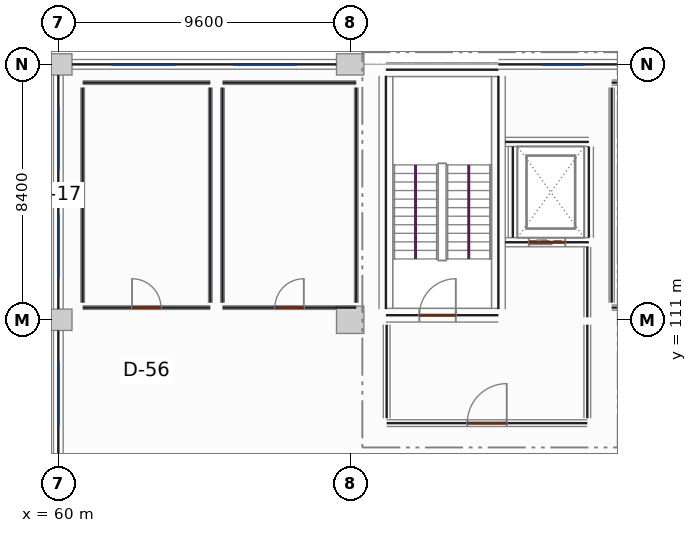
"""IFC4 building model, lengths in metres.
Left out: names, types, materials, properties, quantities, classifications, styles, units other than length and angle.
Written with IfcOpenShell. Run it as: python <this file> out.ifc"""

import sys

from ifc_helpers import new_model, si_unit, direction, frame, frame_2d, origin, origin_2d, place, context, subcontext, project, spatial, rectangle, extrude, element, fill, save


model = new_model("IFC4")
c1 = context("Model", 3, precision=1e-05, world=origin(), true_north=direction((0.0, 1.0)))
c2 = subcontext(c1, "Body", "Model", "MODEL_VIEW")
j1 = project(units=[si_unit("LENGTHUNIT", "METRE"), si_unit("PLANEANGLEUNIT", "RADIAN")], contexts=[c1])
p1 = place(None, origin())
s1 = spatial("IfcSite", under=j1, at=p1, CompositionType="ELEMENT")
p2 = place(p1, origin())
s2 = spatial("IfcBuilding", under=s1, at=p2, CompositionType="ELEMENT")
p3 = place(p2, frame((0.0, 0.0, 9.9)))
s3 = spatial("IfcBuildingStorey", under=s2, at=p3, CompositionType="ELEMENT", Elevation=9.9)
for number, where, z_axis, x_axis in (
    (1, (60.0, 111.0, 0.0), (0.0, 0.0, 1.0), (1.0, 0.0, 0.0)),
    (2, (60.0, 119.4, 0.0), (0.0, 0.0, 1.0), (1.0, 0.0, 0.0)),
):
    element("IfcColumn", number, at=place(p3, frame(where, z_axis=z_axis, x_axis=x_axis)), inside=s3, PredefinedType="COLUMN", context=c2, shape_type="SweptSolid", body=[
        extrude(rectangle(XDim=0.9, YDim=0.7, at=origin_2d()), origin(), (0.0, 0.0, 1.0), 3.9),
    ])
p4 = place(p3, frame((69.6, 111.0, 0.0), z_axis=(0.0, 0.0, 1.0), x_axis=(1.0, 0.0, 0.0)))
e3 = element("IfcColumn", 3, at=p4, inside=s3, PredefinedType="COLUMN", context=c2, shape_type="SweptSolid", body=[
    extrude(rectangle(XDim=0.9, YDim=0.9, at=origin_2d()), origin(), (0.0, 0.0, 1.0), 3.9),
])
p5 = place(p3, frame((69.6, 119.4, 0.0), z_axis=(0.0, 0.0, 1.0), x_axis=(1.0, 0.0, 0.0)))
e4 = element("IfcColumn", 4, at=p5, inside=s3, PredefinedType="COLUMN", context=c2, shape_type="SweptSolid", body=[
    extrude(rectangle(XDim=0.9, YDim=0.7, at=origin_2d()), origin(), (0.0, 0.0, 1.0), 3.9),
])
p6 = place(p3, frame((60.0, 102.952, 0.0), z_axis=(0.0, 0.0, 1.0), x_axis=(0.0, 1.0, 0.0)))
e5 = element("IfcWall", 5, at=p6, inside=s3, PredefinedType="SOLIDWALL", context=c2, shape_type="SweptSolid", body=[
    extrude(rectangle(XDim=7.696, YDim=0.32, at=frame_2d((3.848, 0.0))), origin(), (0.0, 0.0, 1.0), 3.08),
])
p7 = place(p6, frame((1.028, 0.0, 0.85)))
e6 = element("IfcOpeningElement", 6, at=p7, cuts=e5, PredefinedType="OPENING", context=c2, shape_type="SweptSolid", body=[
    extrude(rectangle(XDim=2.1, YDim=1.95, at=frame_2d((1.05, 0.975))), frame((0.0, 0.17, 0.0), z_axis=(0.0, -1.0, 0.0), x_axis=(1.0, 0.0, 0.0)), (0.0, 0.0, 1.0), 0.34),
])
p8 = place(p6, frame((4.568, 0.0, 0.85)))
e7 = element("IfcOpeningElement", 7, at=p8, cuts=e5, PredefinedType="OPENING", context=c2, shape_type="SweptSolid", body=[
    extrude(rectangle(XDim=2.1, YDim=1.95, at=frame_2d((1.05, 0.975))), frame((0.0, 0.17, 0.0), z_axis=(0.0, -1.0, 0.0), x_axis=(1.0, 0.0, 0.0)), (0.0, 0.0, 1.0), 0.34),
])
p9 = place(p3, frame((60.0, 111.352, 0.0), z_axis=(0.0, 0.0, 1.0), x_axis=(0.0, 1.0, 0.0)))
e8 = element("IfcWall", 8, at=p9, inside=s3, PredefinedType="SOLIDWALL", context=c2, shape_type="SweptSolid", body=[
    extrude(rectangle(XDim=7.696, YDim=0.32, at=frame_2d((3.848, 0.0))), origin(), (0.0, 0.0, 1.0), 3.08),
])
p10 = place(p9, frame((1.028, 0.0, 0.85)))
e9 = element("IfcOpeningElement", 9, at=p10, cuts=e8, PredefinedType="OPENING", context=c2, shape_type="SweptSolid", body=[
    extrude(rectangle(XDim=2.1, YDim=1.95, at=frame_2d((1.05, 0.975))), frame((0.0, 0.17, 0.0), z_axis=(0.0, -1.0, 0.0), x_axis=(1.0, 0.0, 0.0)), (0.0, 0.0, 1.0), 0.34),
])
p11 = place(p9, frame((4.568, 0.0, 0.85)))
e10 = element("IfcOpeningElement", 10, at=p11, cuts=e8, PredefinedType="OPENING", context=c2, shape_type="SweptSolid", body=[
    extrude(rectangle(XDim=2.1, YDim=1.95, at=frame_2d((1.05, 0.975))), frame((0.0, 0.17, 0.0), z_axis=(0.0, -1.0, 0.0), x_axis=(1.0, 0.0, 0.0)), (0.0, 0.0, 1.0), 0.34),
])
p12 = place(p3, frame((60.452, 119.4, 0.0), z_axis=(0.0, 0.0, 1.0), x_axis=(1.0, 0.0, 0.0)))
e11 = element("IfcWall", 11, at=p12, inside=s3, PredefinedType="SOLIDWALL", context=c2, shape_type="SweptSolid", body=[
    extrude(rectangle(XDim=8.696, YDim=0.32, at=frame_2d((4.348, 0.0))), origin(), (0.0, 0.0, 1.0), 3.08),
])
p13 = place(p12, frame((1.298, 0.0, 0.85)))
e12 = element("IfcOpeningElement", 12, at=p13, cuts=e11, PredefinedType="OPENING", context=c2, shape_type="SweptSolid", body=[
    extrude(rectangle(XDim=2.1, YDim=1.95, at=frame_2d((1.05, 0.975))), frame((0.0, 0.17, 0.0), z_axis=(0.0, -1.0, 0.0), x_axis=(1.0, 0.0, 0.0)), (0.0, 0.0, 1.0), 0.34),
])
p14 = place(p12, frame((5.298, 0.0, 0.85)))
e13 = element("IfcOpeningElement", 13, at=p14, cuts=e11, PredefinedType="OPENING", context=c2, shape_type="SweptSolid", body=[
    extrude(rectangle(XDim=2.1, YDim=1.95, at=frame_2d((1.05, 0.975))), frame((0.0, 0.17, 0.0), z_axis=(0.0, -1.0, 0.0), x_axis=(1.0, 0.0, 0.0)), (0.0, 0.0, 1.0), 0.34),
])
p15 = place(p3, frame((74.476, 119.4, 0.0), z_axis=(0.0, 0.0, 1.0), x_axis=(1.0, 0.0, 0.0)))
e14 = element("IfcWall", 14, at=p15, inside=s3, PredefinedType="SOLIDWALL", context=c2, shape_type="SweptSolid", body=[
    extrude(rectangle(XDim=4.272, YDim=0.32, at=frame_2d((2.136, 0.0))), origin(), (0.0, 0.0, 1.0), 3.08),
])
p16 = place(p15, frame((1.436, 0.0, 0.9)))
e15 = element("IfcOpeningElement", 15, at=p16, cuts=e14, PredefinedType="OPENING", context=c2, shape_type="SweptSolid", body=[
    extrude(rectangle(XDim=1.4, YDim=1.65, at=frame_2d((0.7, 0.825))), frame((0.0, 0.17, 0.0), z_axis=(0.0, -1.0, 0.0), x_axis=(1.0, 0.0, 0.0)), (0.0, 0.0, 1.0), 0.34),
])
p17 = place(p3, frame((70.775, 111.15, 0.0), z_axis=(0.0, 0.0, 1.0), x_axis=(1.0, 0.0, 0.0)))
e16 = element("IfcWall", 16, at=p17, inside=s3, PredefinedType="SHEAR", context=c2, shape_type="SweptSolid", body=[
    extrude(rectangle(XDim=3.7, YDim=0.45, at=frame_2d((1.85, 0.0))), origin(), (0.0, 0.0, 1.0), 3.9),
])
p18 = place(p17, frame((1.1, 0.0, 0.0)))
e17 = element("IfcOpeningElement", 17, at=p18, cuts=e16, PredefinedType="OPENING", context=c2, shape_type="SweptSolid", body=[
    extrude(rectangle(XDim=1.2, YDim=2.2, at=frame_2d((0.6, 1.1))), frame((0.0, 0.235, 0.0), z_axis=(0.0, -1.0, 0.0), x_axis=(1.0, 0.0, 0.0)), (0.0, 0.0, 1.0), 0.47),
])
for number, where, z_axis, x_axis in (
    (18, (70.775, 111.35, 0.0), (0.0, 0.0, 1.0), (0.0, 1.0, 0.0)),
    (19, (74.475, 111.35, 0.0), (0.0, 0.0, 1.0), (0.0, 1.0, 0.0)),
):
    element("IfcWall", number, at=place(p3, frame(where, z_axis=z_axis, x_axis=x_axis)), inside=s3, PredefinedType="SHEAR", context=c2, shape_type="SweptSolid", body=[
        extrude(rectangle(XDim=7.675, YDim=0.45, at=frame_2d((3.837, 0.0))), origin(), (0.0, 0.0, 1.0), 3.9),
    ])
p19 = place(p3, frame((70.775, 119.225, 0.0), z_axis=(0.0, 0.0, 1.0), x_axis=(1.0, 0.0, 0.0)))
e20 = element("IfcWall", 20, at=p19, inside=s3, PredefinedType="SHEAR", context=c2, shape_type="SweptSolid", body=[
    extrude(rectangle(XDim=3.7, YDim=0.45, at=frame_2d((1.85, 0.0))), origin(), (0.0, 0.0, 1.0), 3.9),
])
p20 = place(p3, frame((74.7, 113.55, 0.0), z_axis=(0.0, 0.0, 1.0), x_axis=(1.0, 0.0, 0.0)))
e21 = element("IfcWall", 21, at=p20, inside=s3, PredefinedType="SHEAR", context=c2, shape_type="SweptSolid", body=[
    extrude(rectangle(XDim=2.75, YDim=0.3, at=frame_2d((1.375, 0.0))), origin(), (0.0, 0.0, 1.0), 3.9),
])
p21 = place(p20, frame((0.775, 0.0, 0.0)))
e22 = element("IfcOpeningElement", 22, at=p21, cuts=e21, PredefinedType="OPENING", context=c2, shape_type="SweptSolid", body=[
    extrude(rectangle(XDim=1.2, YDim=2.2, at=frame_2d((0.6, 1.1))), frame((0.0, 0.16, 0.0), z_axis=(0.0, -1.0, 0.0), x_axis=(1.0, 0.0, 0.0)), (0.0, 0.0, 1.0), 0.32),
])
p22 = place(p3, frame((74.7, 116.85, 0.0), z_axis=(0.0, 0.0, 1.0), x_axis=(1.0, 0.0, 0.0)))
e23 = element("IfcWall", 23, at=p22, inside=s3, PredefinedType="SHEAR", context=c2, shape_type="SweptSolid", body=[
    extrude(rectangle(XDim=2.75, YDim=0.3, at=frame_2d((1.375, 0.0))), origin(), (0.0, 0.0, 1.0), 3.9),
])
for number, where, z_axis, x_axis in (
    (24, (74.95, 113.7, 0.0), (0.0, 0.0, 1.0), (0.0, 1.0, 0.0)),
    (25, (77.45, 113.7, 0.0), (0.0, 0.0, 1.0), (0.0, 1.0, 0.0)),
):
    element("IfcWall", number, at=place(p3, frame(where, z_axis=z_axis, x_axis=x_axis)), inside=s3, PredefinedType="SHEAR", context=c2, shape_type="SweptSolid", body=[
        extrude(rectangle(XDim=3.0, YDim=0.3, at=frame_2d((1.5, 0.0))), origin(), (0.0, 0.0, 1.0), 3.9),
    ])
p23 = place(p3, frame((70.8, 107.6, 0.0), z_axis=(0.0, 0.0, 1.0), x_axis=(1.0, 0.0, 0.0)))
e26 = element("IfcWall", 26, at=p23, inside=s3, PredefinedType="PARTITIONING", context=c2, shape_type="SweptSolid", body=[
    extrude(rectangle(XDim=6.6, YDim=0.22, at=frame_2d((3.3, 0.0))), origin(), (0.0, 0.0, 1.0), 2.92),
])
p24 = place(p23, frame((2.65, 0.0, 0.0)))
e27 = element("IfcOpeningElement", 27, at=p24, cuts=e26, PredefinedType="OPENING", context=c2, shape_type="SweptSolid", body=[
    extrude(rectangle(XDim=1.3, YDim=2.2, at=frame_2d((0.65, 1.1))), frame((0.0, 0.12, 0.0), z_axis=(0.0, -1.0, 0.0), x_axis=(1.0, 0.0, 0.0)), (0.0, 0.0, 1.0), 0.24),
])
p25 = place(p3, frame((77.4, 111.08, 0.0), z_axis=(0.0, 0.0, 1.0), x_axis=(0.0, 1.0, 0.0)))
e28 = element("IfcWall", 28, at=p25, inside=s3, PredefinedType="PARTITIONING", context=c2, shape_type="SweptSolid", body=[
    extrude(rectangle(XDim=2.32, YDim=0.22, at=frame_2d((1.16, 0.0))), origin(), (0.0, 0.0, 1.0), 2.92),
])
for number, where, z_axis, x_axis in (
    (29, (70.8, 107.76, 0.0), (0.0, 0.0, 1.0), (0.0, 1.0, 0.0)),
    (30, (77.4, 107.76, 0.0), (0.0, 0.0, 1.0), (0.0, 1.0, 0.0)),
):
    element("IfcWall", number, at=place(p3, frame(where, z_axis=z_axis, x_axis=x_axis)), inside=s3, PredefinedType="PARTITIONING", context=c2, shape_type="SweptSolid", body=[
        extrude(rectangle(XDim=3.08, YDim=0.22, at=frame_2d((1.54, 0.0))), origin(), (0.0, 0.0, 1.0), 2.92),
    ])
p26 = place(p3, frame((78.2, 111.4, 0.0), z_axis=(0.0, 0.0, 1.0), x_axis=(1.0, 0.0, 0.0)))
e31 = element("IfcWall", 31, at=p26, inside=s3, PredefinedType="PARTITIONING", context=c2, shape_type="SweptSolid", body=[
    extrude(rectangle(XDim=21.4, YDim=0.17, at=frame_2d((10.7, 0.0))), origin(), (0.0, 0.0, 1.0), 2.92),
])
p27 = place(p26, frame((6.94, 0.0, 0.0)))
e32 = element("IfcOpeningElement", 32, at=p27, cuts=e31, PredefinedType="OPENING", context=c2, shape_type="SweptSolid", body=[
    extrude(rectangle(XDim=1.1, YDim=2.2, at=frame_2d((0.55, 1.1))), frame((0.0, 0.095, 0.0), z_axis=(0.0, -1.0, 0.0), x_axis=(1.0, 0.0, 0.0)), (0.0, 0.0, 1.0), 0.19),
])
p28 = place(p3, frame((78.2, 118.8, 0.0), z_axis=(0.0, 0.0, 1.0), x_axis=(1.0, 0.0, 0.0)))
e33 = element("IfcWall", 33, at=p28, inside=s3, PredefinedType="PARTITIONING", context=c2, shape_type="SweptSolid", body=[
    extrude(rectangle(XDim=21.4, YDim=0.17, at=frame_2d((10.7, 0.0))), origin(), (0.0, 0.0, 1.0), 2.92),
])
p29 = place(p3, frame((78.2, 111.56, 0.0), z_axis=(0.0, 0.0, 1.0), x_axis=(0.0, 1.0, 0.0)))
e34 = element("IfcWall", 34, at=p29, inside=s3, PredefinedType="PARTITIONING", context=c2, shape_type="SweptSolid", body=[
    extrude(rectangle(XDim=7.08, YDim=0.17, at=frame_2d((3.54, 0.0))), origin(), (0.0, 0.0, 1.0), 2.92),
])
p30 = place(p3, frame((60.8, 111.4, 0.0), z_axis=(0.0, 0.0, 1.0), x_axis=(1.0, 0.0, 0.0)))
e35 = element("IfcWall", 35, at=p30, inside=s3, PredefinedType="PARTITIONING", context=c2, shape_type="SweptSolid", body=[
    extrude(rectangle(XDim=4.2, YDim=0.12, at=frame_2d((2.1, 0.0))), origin(), (0.0, 0.0, 1.0), 2.92),
])
p31 = place(p30, frame((1.625, 0.0, 0.0)))
e36 = element("IfcOpeningElement", 36, at=p31, cuts=e35, PredefinedType="OPENING", context=c2, shape_type="SweptSolid", body=[
    extrude(rectangle(XDim=0.95, YDim=2.1, at=frame_2d((0.475, 1.05))), frame((0.0, 0.07, 0.0), z_axis=(0.0, -1.0, 0.0), x_axis=(1.0, 0.0, 0.0)), (0.0, 0.0, 1.0), 0.14),
])
p32 = place(p3, frame((60.8, 118.8, 0.0), z_axis=(0.0, 0.0, 1.0), x_axis=(1.0, 0.0, 0.0)))
e37 = element("IfcWall", 37, at=p32, inside=s3, PredefinedType="PARTITIONING", context=c2, shape_type="SweptSolid", body=[
    extrude(rectangle(XDim=4.2, YDim=0.12, at=frame_2d((2.1, 0.0))), origin(), (0.0, 0.0, 1.0), 2.92),
])
for number, where, z_axis, x_axis in (
    (38, (60.8, 111.56, 0.0), (0.0, 0.0, 1.0), (0.0, 1.0, 0.0)),
    (39, (65.0, 111.56, 0.0), (0.0, 0.0, 1.0), (0.0, 1.0, 0.0)),
):
    element("IfcWall", number, at=place(p3, frame(where, z_axis=z_axis, x_axis=x_axis)), inside=s3, PredefinedType="PARTITIONING", context=c2, shape_type="SweptSolid", body=[
        extrude(rectangle(XDim=7.08, YDim=0.12, at=frame_2d((3.54, 0.0))), origin(), (0.0, 0.0, 1.0), 2.92),
    ])
p33 = place(p3, frame((65.4, 111.4, 0.0), z_axis=(0.0, 0.0, 1.0), x_axis=(1.0, 0.0, 0.0)))
e40 = element("IfcWall", 40, at=p33, inside=s3, PredefinedType="PARTITIONING", context=c2, shape_type="SweptSolid", body=[
    extrude(rectangle(XDim=4.4, YDim=0.12, at=frame_2d((2.2, 0.0))), origin(), (0.0, 0.0, 1.0), 2.92),
])
p34 = place(p33, frame((1.725, 0.0, 0.0)))
e41 = element("IfcOpeningElement", 41, at=p34, cuts=e40, PredefinedType="OPENING", context=c2, shape_type="SweptSolid", body=[
    extrude(rectangle(XDim=0.95, YDim=2.1, at=frame_2d((0.475, 1.05))), frame((0.0, 0.07, 0.0), z_axis=(0.0, -1.0, 0.0), x_axis=(1.0, 0.0, 0.0)), (0.0, 0.0, 1.0), 0.14),
])
p35 = place(p3, frame((65.4, 118.8, 0.0), z_axis=(0.0, 0.0, 1.0), x_axis=(1.0, 0.0, 0.0)))
e42 = element("IfcWall", 42, at=p35, inside=s3, PredefinedType="PARTITIONING", context=c2, shape_type="SweptSolid", body=[
    extrude(rectangle(XDim=4.4, YDim=0.12, at=frame_2d((2.2, 0.0))), origin(), (0.0, 0.0, 1.0), 2.92),
])
for number, where, z_axis, x_axis in (
    (43, (65.4, 111.56, 0.0), (0.0, 0.0, 1.0), (0.0, 1.0, 0.0)),
    (44, (69.8, 111.56, 0.0), (0.0, 0.0, 1.0), (0.0, 1.0, 0.0)),
):
    element("IfcWall", number, at=place(p3, frame(where, z_axis=z_axis, x_axis=x_axis)), inside=s3, PredefinedType="PARTITIONING", context=c2, shape_type="SweptSolid", body=[
        extrude(rectangle(XDim=7.08, YDim=0.12, at=frame_2d((3.54, 0.0))), origin(), (0.0, 0.0, 1.0), 2.92),
    ])
p36 = place(p8, origin())
e45 = element("IfcWindow", 45, at=p36, inside=s3, PartitioningType="SINGLE_PANEL", PredefinedType="WINDOW", context=c2, shape_type="SweptSolid", body=[
    extrude(rectangle(XDim=2.1, YDim=1.95, at=frame_2d((1.05, 0.975))), frame((0.0, 0.03, 0.0), z_axis=(0.0, -1.0, 0.0), x_axis=(1.0, 0.0, 0.0)), (0.0, 0.0, 1.0), 0.06),
])
fill(e7, e45)
p37 = place(p10, origin())
e46 = element("IfcWindow", 46, at=p37, inside=s3, PartitioningType="SINGLE_PANEL", PredefinedType="WINDOW", context=c2, shape_type="SweptSolid", body=[
    extrude(rectangle(XDim=2.1, YDim=1.95, at=frame_2d((1.05, 0.975))), frame((0.0, 0.03, 0.0), z_axis=(0.0, -1.0, 0.0), x_axis=(1.0, 0.0, 0.0)), (0.0, 0.0, 1.0), 0.06),
])
fill(e9, e46)
p38 = place(p11, origin())
e47 = element("IfcWindow", 47, at=p38, inside=s3, PartitioningType="SINGLE_PANEL", PredefinedType="WINDOW", context=c2, shape_type="SweptSolid", body=[
    extrude(rectangle(XDim=2.1, YDim=1.95, at=frame_2d((1.05, 0.975))), frame((0.0, 0.03, 0.0), z_axis=(0.0, -1.0, 0.0), x_axis=(1.0, 0.0, 0.0)), (0.0, 0.0, 1.0), 0.06),
])
fill(e10, e47)
p39 = place(p13, origin())
e48 = element("IfcWindow", 48, at=p39, inside=s3, PartitioningType="SINGLE_PANEL", PredefinedType="WINDOW", context=c2, shape_type="SweptSolid", body=[
    extrude(rectangle(XDim=2.1, YDim=1.95, at=frame_2d((1.05, 0.975))), frame((0.0, 0.03, 0.0), z_axis=(0.0, -1.0, 0.0), x_axis=(1.0, 0.0, 0.0)), (0.0, 0.0, 1.0), 0.06),
])
fill(e12, e48)
p40 = place(p14, origin())
e49 = element("IfcWindow", 49, at=p40, inside=s3, PartitioningType="SINGLE_PANEL", PredefinedType="WINDOW", context=c2, shape_type="SweptSolid", body=[
    extrude(rectangle(XDim=2.1, YDim=1.95, at=frame_2d((1.05, 0.975))), frame((0.0, 0.03, 0.0), z_axis=(0.0, -1.0, 0.0), x_axis=(1.0, 0.0, 0.0)), (0.0, 0.0, 1.0), 0.06),
])
fill(e13, e49)
p41 = place(p16, origin())
e50 = element("IfcWindow", 50, at=p41, inside=s3, PartitioningType="SINGLE_PANEL", PredefinedType="WINDOW", context=c2, shape_type="SweptSolid", body=[
    extrude(rectangle(XDim=1.4, YDim=1.65, at=frame_2d((0.7, 0.825))), frame((0.0, 0.03, 0.0), z_axis=(0.0, -1.0, 0.0), x_axis=(1.0, 0.0, 0.0)), (0.0, 0.0, 1.0), 0.06),
])
fill(e15, e50)
p42 = place(p18, origin())
e51 = element("IfcDoor", 51, at=p42, inside=s3, OperationType="SINGLE_SWING_RIGHT", PredefinedType="DOOR", context=c2, shape_type="SweptSolid", body=[
    extrude(rectangle(XDim=1.2, YDim=2.2, at=frame_2d((0.6, 1.1))), frame((0.0, 0.025, 0.0), z_axis=(0.0, -1.0, 0.0), x_axis=(1.0, 0.0, 0.0)), (0.0, 0.0, 1.0), 0.05),
])
fill(e17, e51)
p43 = place(p21, origin())
e52 = element("IfcDoor", 52, at=p43, inside=s3, OperationType="SLIDING_TO_LEFT", PredefinedType="DOOR", context=c2, shape_type="SweptSolid", body=[
    extrude(rectangle(XDim=1.2, YDim=2.2, at=frame_2d((0.6, 1.1))), frame((0.0, 0.025, 0.0), z_axis=(0.0, -1.0, 0.0), x_axis=(1.0, 0.0, 0.0)), (0.0, 0.0, 1.0), 0.05),
])
fill(e22, e52)
p44 = place(p24, origin())
e53 = element("IfcDoor", 53, at=p44, inside=s3, OperationType="SINGLE_SWING_RIGHT", PredefinedType="DOOR", context=c2, shape_type="SweptSolid", body=[
    extrude(rectangle(XDim=1.3, YDim=2.2, at=frame_2d((0.65, 1.1))), frame((0.0, 0.025, 0.0), z_axis=(0.0, -1.0, 0.0), x_axis=(1.0, 0.0, 0.0)), (0.0, 0.0, 1.0), 0.05),
])
fill(e27, e53)
p45 = place(p31, origin())
e54 = element("IfcDoor", 54, at=p45, inside=s3, OperationType="SINGLE_SWING_LEFT", PredefinedType="DOOR", context=c2, shape_type="SweptSolid", body=[
    extrude(rectangle(XDim=0.95, YDim=2.1, at=frame_2d((0.475, 1.05))), frame((0.0, 0.025, 0.0), z_axis=(0.0, -1.0, 0.0), x_axis=(1.0, 0.0, 0.0)), (0.0, 0.0, 1.0), 0.05),
])
fill(e36, e54)
p46 = place(p34, origin())
e55 = element("IfcDoor", 55, at=p46, inside=s3, OperationType="SINGLE_SWING_RIGHT", PredefinedType="DOOR", context=c2, shape_type="SweptSolid", body=[
    extrude(rectangle(XDim=0.95, YDim=2.1, at=frame_2d((0.475, 1.05))), frame((0.0, 0.025, 0.0), z_axis=(0.0, -1.0, 0.0), x_axis=(1.0, 0.0, 0.0)), (0.0, 0.0, 1.0), 0.05),
])
fill(e41, e55)
save(model, sys.argv[1])
